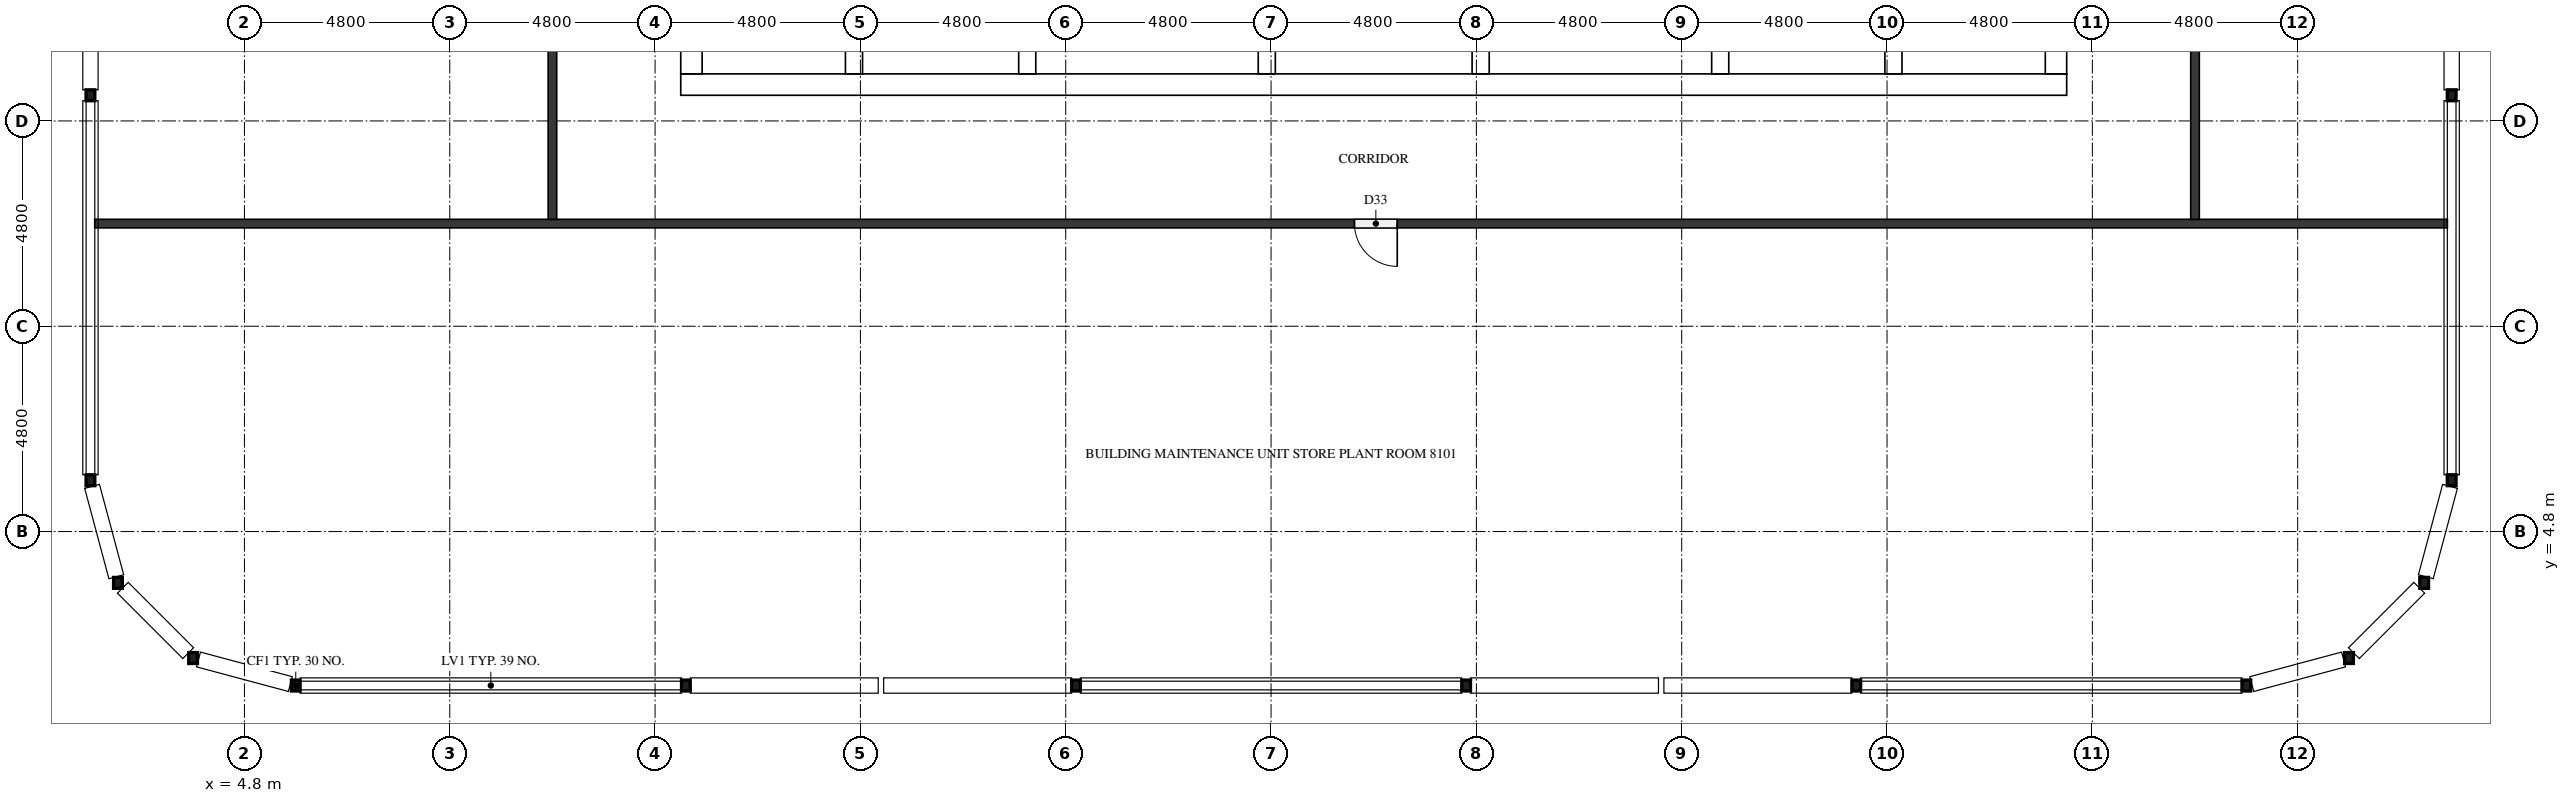
"""IFC4 building model, lengths in metres.
Left out: names, types, materials, properties, quantities, classifications, styles, units other than length and angle.
Written with IfcOpenShell. Run it as: python <this file> out.ifc"""

import sys

from ifc_helpers import new_model, si_unit, direction, frame, frame_2d, origin, origin_2d, place, context, subcontext, project, spatial, rectangle, hollow_rectangle, extrude, element, fill, save


model = new_model("IFC4")
c1 = context("Model", 3, precision=1e-05, world=origin(), true_north=direction((0.0, 1.0)))
c2 = subcontext(c1, "Body", "Model", "MODEL_VIEW")
j1 = project(units=[si_unit("LENGTHUNIT", "METRE"), si_unit("PLANEANGLEUNIT", "RADIAN")], contexts=[c1])
p1 = place(None, origin())
s1 = spatial("IfcSite", under=j1, at=p1, CompositionType="ELEMENT")
p2 = place(p1, origin())
s2 = spatial("IfcBuilding", under=s1, at=p2, CompositionType="ELEMENT")
p3 = place(p2, frame((0.0, 0.0, 314.3)))
s3 = spatial("IfcBuildingStorey", under=s2, at=p3, CompositionType="ELEMENT", Elevation=314.3)
p4 = place(p3, frame((15.0, 15.25, 0.0), z_axis=(0.0, 0.0, 1.0), x_axis=(1.0, 0.0, 0.0)))
e1 = element("IfcWall", 1, at=p4, inside=s3, PredefinedType="SHEAR", context=c2, shape_type="SweptSolid", body=[
    extrude(rectangle(XDim=32.4, YDim=0.5, at=frame_2d((16.2, 0.0))), origin(), (0.0, 0.0, 1.0), 2.6),
])
p5 = place(p4, frame((15.3, 0.0, 0.0)))
e2 = element("IfcOpeningElement", 2, at=p5, cuts=e1, PredefinedType="OPENING", context=c2, shape_type="SweptSolid", body=[
    extrude(rectangle(XDim=1.8, YDim=2.1, at=frame_2d((0.9, 1.05))), frame((0.0, 0.26, 0.0), z_axis=(0.0, -1.0, 0.0), x_axis=(1.0, 0.0, 0.0)), (0.0, 0.0, 1.0), 0.52),
])
p6 = place(p3, frame((15.25, 15.5, 0.0), z_axis=(0.0, 0.0, 1.0), x_axis=(0.0, 1.0, 0.0)))
e3 = element("IfcWall", 3, at=p6, inside=s3, PredefinedType="SHEAR", context=c2, shape_type="SweptSolid", body=[
    extrude(rectangle(XDim=21.8, YDim=0.5, at=frame_2d((10.9, 0.0))), origin(), (0.0, 0.0, 1.0), 2.6),
])
p7 = place(p6, frame((5.26, 0.0, 0.0)))
e4 = element("IfcOpeningElement", 4, at=p7, cuts=e3, PredefinedType="OPENING", context=c2, shape_type="SweptSolid", body=[
    extrude(rectangle(XDim=1.2, YDim=2.1, at=frame_2d((0.6, 1.05))), frame((0.0, 0.26, 0.0), z_axis=(0.0, -1.0, 0.0), x_axis=(1.0, 0.0, 0.0)), (0.0, 0.0, 1.0), 0.52),
])
p8 = place(p3, frame((47.15, 15.5, 0.0), z_axis=(0.0, 0.0, 1.0), x_axis=(0.0, 1.0, 0.0)))
e5 = element("IfcWall", 5, at=p8, inside=s3, PredefinedType="SHEAR", context=c2, shape_type="SweptSolid", body=[
    extrude(rectangle(XDim=21.8, YDim=0.5, at=frame_2d((10.9, 0.0))), origin(), (0.0, 0.0, 1.0), 2.6),
])
p9 = place(p8, frame((10.6, 0.0, 0.0)))
e6 = element("IfcOpeningElement", 6, at=p9, cuts=e5, PredefinedType="OPENING", context=c2, shape_type="SweptSolid", body=[
    extrude(rectangle(XDim=1.2, YDim=2.1, at=frame_2d((0.6, 1.05))), frame((0.0, 0.26, 0.0), z_axis=(0.0, -1.0, 0.0), x_axis=(1.0, 0.0, 0.0)), (0.0, 0.0, 1.0), 0.52),
])
p10 = place(p3, frame((19.05, 15.5, 0.0), z_axis=(0.0, 0.0, 1.0), x_axis=(0.0, 1.0, 0.0)))
e7 = element("IfcWall", 7, at=p10, inside=s3, PredefinedType="SHEAR", context=c2, shape_type="SweptSolid", body=[
    extrude(rectangle(XDim=15.55, YDim=0.4, at=frame_2d((7.775, 0.0))), origin(), (0.0, 0.0, 1.0), 2.6),
])
p11 = place(p10, frame((9.95, 0.0, 0.0)))
e8 = element("IfcOpeningElement", 8, at=p11, cuts=e7, PredefinedType="OPENING", context=c2, shape_type="SweptSolid", body=[
    extrude(rectangle(XDim=1.1, YDim=2.1, at=frame_2d((0.55, 1.05))), frame((0.0, 0.21, 0.0), z_axis=(0.0, -1.0, 0.0), x_axis=(1.0, 0.0, 0.0)), (0.0, 0.0, 1.0), 0.42),
])
p12 = place(p10, frame((13.45, 0.0, 0.0)))
e9 = element("IfcOpeningElement", 9, at=p12, cuts=e7, PredefinedType="OPENING", context=c2, shape_type="SweptSolid", body=[
    extrude(rectangle(XDim=1.1, YDim=2.1, at=frame_2d((0.55, 1.05))), frame((0.0, 0.21, 0.0), z_axis=(0.0, -1.0, 0.0), x_axis=(1.0, 0.0, 0.0)), (0.0, 0.0, 1.0), 0.42),
])
p13 = place(p10, frame((0.7, 0.0, 0.0)))
e10 = element("IfcOpeningElement", 10, at=p13, cuts=e7, PredefinedType="OPENING", context=c2, shape_type="SweptSolid", body=[
    extrude(rectangle(XDim=1.2, YDim=2.1, at=frame_2d((0.6, 1.05))), frame((0.0, 0.21, 0.0), z_axis=(0.0, -1.0, 0.0), x_axis=(1.0, 0.0, 0.0)), (0.0, 0.0, 1.0), 0.42),
])
p14 = place(p3, frame((23.1, 15.5, 0.0), z_axis=(0.0, 0.0, 1.0), x_axis=(0.0, 1.0, 0.0)))
e11 = element("IfcWall", 11, at=p14, inside=s3, PredefinedType="SHEAR", context=c2, shape_type="SweptSolid", body=[
    extrude(rectangle(XDim=21.8, YDim=0.4, at=frame_2d((10.9, 0.0))), origin(), (0.0, 0.0, 1.0), 2.6),
])
p15 = place(p3, frame((39.3, 15.5, 0.0), z_axis=(0.0, 0.0, 1.0), x_axis=(0.0, 1.0, 0.0)))
e12 = element("IfcWall", 12, at=p15, inside=s3, PredefinedType="SHEAR", context=c2, shape_type="SweptSolid", body=[
    extrude(rectangle(XDim=8.75, YDim=0.4, at=frame_2d((4.375, 0.0))), origin(), (0.0, 0.0, 1.0), 2.6),
])
p16 = place(p3, frame((43.35, 15.5, 0.0), z_axis=(0.0, 0.0, 1.0), x_axis=(0.0, 1.0, 0.0)))
e13 = element("IfcWall", 13, at=p16, inside=s3, PredefinedType="SHEAR", context=c2, shape_type="SweptSolid", body=[
    extrude(rectangle(XDim=8.75, YDim=0.4, at=frame_2d((4.375, 0.0))), origin(), (0.0, 0.0, 1.0), 2.6),
])
p17 = place(p16, frame((0.7, 0.0, 0.0)))
e14 = element("IfcOpeningElement", 14, at=p17, cuts=e13, PredefinedType="OPENING", context=c2, shape_type="SweptSolid", body=[
    extrude(rectangle(XDim=1.2, YDim=2.1, at=frame_2d((0.6, 1.05))), frame((0.0, 0.21, 0.0), z_axis=(0.0, -1.0, 0.0), x_axis=(1.0, 0.0, 0.0)), (0.0, 0.0, 1.0), 0.42),
])
for number, where, z_axis, x_axis in (
    (15, (28.7, 15.5, 0.0), (0.0, 0.0, 1.0), (0.0, 1.0, 0.0)),
    (16, (33.7, 15.5, 0.0), (0.0, 0.0, 1.0), (0.0, 1.0, 0.0)),
):
    element("IfcWall", number, at=place(p3, frame(where, z_axis=z_axis, x_axis=x_axis)), inside=s3, PredefinedType="SHEAR", context=c2, shape_type="SweptSolid", body=[
        extrude(rectangle(XDim=3.05, YDim=0.4, at=frame_2d((1.525, 0.0))), origin(), (0.0, 0.0, 1.0), 2.6),
    ])
for number, where, z_axis, x_axis in (
    (17, (6.0, 1.2, 0.0), (0.0, 0.0, 1.0), (1.0, 0.0, 0.0)),
    (18, (15.12, 1.2, 0.0), (0.0, 0.0, 1.0), (1.0, 0.0, 0.0)),
    (19, (24.24, 1.2, 0.0), (0.0, 0.0, 1.0), (1.0, 0.0, 0.0)),
    (20, (33.36, 1.2, 0.0), (0.0, 0.0, 1.0), (1.0, 0.0, 0.0)),
    (21, (42.48, 1.2, 0.0), (0.0, 0.0, 1.0), (1.0, 0.0, 0.0)),
    (22, (51.6, 1.2, 0.0), (0.0, 0.0, 1.0), (1.0, 0.0, 0.0)),
    (23, (54.0, 1.843, 0.0), (0.0, 0.0, 1.0), (1.0, 0.0, 0.0)),
    (24, (55.757, 3.6, 0.0), (0.0, 0.0, 1.0), (1.0, 0.0, 0.0)),
    (25, (56.4, 6.0, 0.0), (0.0, 0.0, 1.0), (1.0, 0.0, 0.0)),
    (26, (56.4, 15.0, 0.0), (0.0, 0.0, 1.0), (1.0, 0.0, 0.0)),
    (27, (1.2, 15.0, 0.0), (0.0, 0.0, 1.0), (1.0, 0.0, 0.0)),
    (28, (1.2, 6.0, 0.0), (0.0, 0.0, 1.0), (1.0, 0.0, 0.0)),
    (29, (1.843, 3.6, 0.0), (0.0, 0.0, 1.0), (1.0, 0.0, 0.0)),
    (30, (3.6, 1.843, 0.0), (0.0, 0.0, 1.0), (1.0, 0.0, 0.0)),
):
    element("IfcColumn", number, at=place(p3, frame(where, z_axis=z_axis, x_axis=x_axis)), inside=s3, PredefinedType="COLUMN", context=c2, shape_type="SweptSolid", body=[
        extrude(hollow_rectangle(XDim=0.203, YDim=0.254, WallThickness=0.01, InnerFilletRadius=0.004, OuterFilletRadius=0.013, at=origin_2d()), origin(), (0.0, 0.0, 1.0), 2.6),
    ])
p18 = place(p3, frame((56.3, 12.0, 0.0), z_axis=(0.0, 0.0, 1.0), x_axis=(-1.0, 0.0, 0.0)))
e31 = element("IfcWall", 31, at=p18, inside=s3, PredefinedType="PARTITIONING", context=c2, shape_type="SweptSolid", body=[
    extrude(rectangle(XDim=55.0, YDim=0.2, at=frame_2d((27.5, 0.0))), origin(), (0.0, 0.0, 1.0), 2.6),
])
p19 = place(p18, frame((24.55, 0.0, 0.0)))
e32 = element("IfcOpeningElement", 32, at=p19, cuts=e31, PredefinedType="OPENING", context=c2, shape_type="SweptSolid", body=[
    extrude(rectangle(XDim=1.0, YDim=2.1, at=frame_2d((0.5, 1.05))), frame((0.0, 0.11, 0.0), z_axis=(0.0, -1.0, 0.0), x_axis=(1.0, 0.0, 0.0)), (0.0, 0.0, 1.0), 0.22),
])
p20 = place(p3, frame((12.0, 12.1, 0.0), z_axis=(0.0, 0.0, 1.0), x_axis=(0.0, 1.0, 0.0)))
e33 = element("IfcWall", 33, at=p20, inside=s3, PredefinedType="PARTITIONING", context=c2, shape_type="SweptSolid", body=[
    extrude(rectangle(XDim=28.6, YDim=0.2, at=frame_2d((14.3, 0.0))), origin(), (0.0, 0.0, 1.0), 2.6),
])
p21 = place(p20, frame((13.75, 0.0, 0.0)))
e34 = element("IfcOpeningElement", 34, at=p21, cuts=e33, PredefinedType="OPENING", context=c2, shape_type="SweptSolid", body=[
    extrude(rectangle(XDim=1.0, YDim=2.1, at=frame_2d((0.5, 1.05))), frame((0.0, 0.11, 0.0), z_axis=(0.0, -1.0, 0.0), x_axis=(1.0, 0.0, 0.0)), (0.0, 0.0, 1.0), 0.22),
])
p22 = place(p3, frame((50.4, 40.7, 0.0), z_axis=(0.0, 0.0, 1.0), x_axis=(0.0, -1.0, 0.0)))
e35 = element("IfcWall", 35, at=p22, inside=s3, PredefinedType="PARTITIONING", context=c2, shape_type="SweptSolid", body=[
    extrude(rectangle(XDim=28.6, YDim=0.2, at=frame_2d((14.3, 0.0))), origin(), (0.0, 0.0, 1.0), 2.6),
])
p23 = place(p22, frame((13.75, 0.0, 0.0)))
e36 = element("IfcOpeningElement", 36, at=p23, cuts=e35, PredefinedType="OPENING", context=c2, shape_type="SweptSolid", body=[
    extrude(rectangle(XDim=1.0, YDim=2.1, at=frame_2d((0.5, 1.05))), frame((0.0, 0.11, 0.0), z_axis=(0.0, -1.0, 0.0), x_axis=(1.0, 0.0, 0.0)), (0.0, 0.0, 1.0), 0.22),
])
p24 = place(p5, frame((1.8, 0.0, 0.0), z_axis=(0.0, 0.0, 1.0), x_axis=(-1.0, 0.0, 0.0)))
e37 = element("IfcDoor", 37, at=p24, inside=s3, OperationType="DOUBLE_DOOR_SINGLE_SWING", PredefinedType="DOOR", context=c2, shape_type="SweptSolid", body=[
    extrude(rectangle(XDim=1.8, YDim=2.1, at=frame_2d((0.9, 1.05))), frame((0.0, 0.025, 0.0), z_axis=(0.0, -1.0, 0.0), x_axis=(1.0, 0.0, 0.0)), (0.0, 0.0, 1.0), 0.05),
])
fill(e2, e37)
p25 = place(p19, origin())
e38 = element("IfcDoor", 38, at=p25, inside=s3, OperationType="SINGLE_SWING_LEFT", PredefinedType="DOOR", context=c2, shape_type="SweptSolid", body=[
    extrude(rectangle(XDim=1.0, YDim=2.1, at=frame_2d((0.5, 1.05))), frame((0.0, 0.025, 0.0), z_axis=(0.0, -1.0, 0.0), x_axis=(1.0, 0.0, 0.0)), (0.0, 0.0, 1.0), 0.05),
])
fill(e32, e38)
save(model, sys.argv[1])
